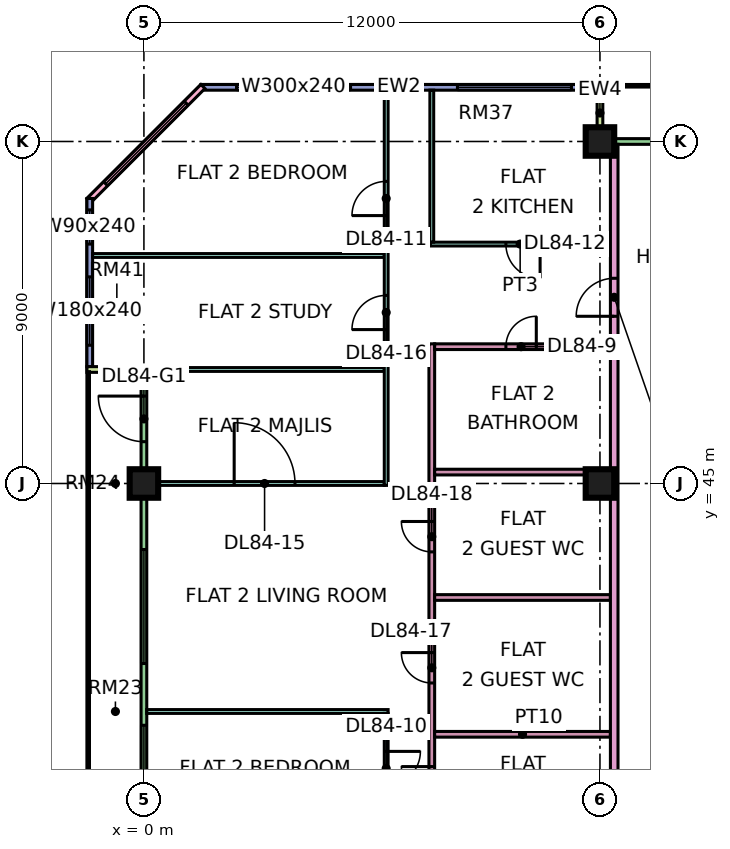
"""IFC4 building model, lengths in metres.
Left out: names, types, materials, properties, quantities, classifications, styles, units other than length and angle.
Written with IfcOpenShell. Run it as: python <this file> out.ifc"""

import sys

from ifc_helpers import new_model, si_unit, direction, frame, frame_2d, origin, origin_2d, place, context, subcontext, project, spatial, rectangle, extrude, element, fill, save


model = new_model("IFC4")
c1 = context("Model", 3, precision=1e-05, world=origin(), true_north=direction((0.0, 1.0)))
c2 = subcontext(c1, "Body", "Model", "MODEL_VIEW")
j1 = project(units=[si_unit("LENGTHUNIT", "METRE"), si_unit("PLANEANGLEUNIT", "RADIAN")], contexts=[c1])
p1 = place(None, origin())
s1 = spatial("IfcSite", under=j1, at=p1, CompositionType="ELEMENT")
p2 = place(p1, origin())
s2 = spatial("IfcBuilding", under=s1, at=p2, CompositionType="ELEMENT")
p3 = place(p2, frame((0.0, 0.0, 361.4)))
s3 = spatial("IfcBuildingStorey", under=s2, at=p3, CompositionType="ELEMENT", Elevation=361.4)
for number, where, z_axis, x_axis in (
    (1, (0.0, 45.0, 0.0), (0.0, 0.0, 1.0), (1.0, 0.0, 0.0)),
    (2, (12.0, 45.0, 0.0), (0.0, 0.0, 1.0), (1.0, 0.0, 0.0)),
    (3, (12.0, 54.0, 0.0), (0.0, 0.0, 1.0), (1.0, 0.0, 0.0)),
):
    element("IfcColumn", number, at=place(p3, frame(where, z_axis=z_axis, x_axis=x_axis)), inside=s3, PredefinedType="COLUMN", context=c2, shape_type="SweptSolid", body=[
        extrude(rectangle(XDim=0.75, YDim=0.75, at=origin_2d()), origin(), (0.0, 0.0, 1.0), 3.75),
    ])
p4 = place(p3, frame((22.425, 54.0, 0.0), z_axis=(0.0, 0.0, 1.0), x_axis=(-1.0, 0.0, 0.0)))
e4 = element("IfcWall", 4, at=p4, inside=s3, PredefinedType="SOLIDWALL", context=c2, shape_type="SweptSolid", body=[
    extrude(rectangle(XDim=10.35, YDim=0.15, at=frame_2d((5.175, 0.0))), origin(), (0.0, 0.0, 1.0), 3.35),
])
p5 = place(p4, frame((1.012, 0.0, 0.45)))
e5 = element("IfcOpeningElement", 5, at=p5, cuts=e4, PredefinedType="OPENING", context=c2, shape_type="SweptSolid", body=[
    extrude(rectangle(XDim=4.8, YDim=2.4, at=frame_2d((2.4, 1.2))), frame((0.0, 0.085, 0.0), z_axis=(0.0, -1.0, 0.0), x_axis=(1.0, 0.0, 0.0)), (0.0, 0.0, 1.0), 0.17),
])
p6 = place(p3, frame((12.0, 55.5, 0.0), z_axis=(0.0, 0.0, 1.0), x_axis=(0.0, -1.0, 0.0)))
e6 = element("IfcWall", 6, at=p6, inside=s3, PredefinedType="SOLIDWALL", context=c2, shape_type="SweptSolid", body=[
    extrude(rectangle(XDim=1.5, YDim=0.15, at=frame_2d((0.75, 0.0))), origin(), (0.0, 0.0, 1.0), 3.35),
])
p7 = place(p3, frame((11.925, 55.425, 0.0), z_axis=(0.0, 0.0, 1.0), x_axis=(-1.0, 0.0, 0.0)))
e7 = element("IfcWall", 7, at=p7, inside=s3, PredefinedType="SOLIDWALL", context=c2, shape_type="SweptSolid", body=[
    extrude(rectangle(XDim=10.425, YDim=0.15, at=frame_2d((5.212, 0.0))), origin(), (0.0, 0.0, 1.0), 3.35),
])
p8 = place(p7, frame((0.675, 0.0, 0.45)))
e8 = element("IfcOpeningElement", 8, at=p8, cuts=e7, PredefinedType="OPENING", context=c2, shape_type="SweptSolid", body=[
    extrude(rectangle(XDim=3.0, YDim=2.4, at=frame_2d((1.5, 1.2))), frame((0.0, 0.085, 0.0), z_axis=(0.0, -1.0, 0.0), x_axis=(1.0, 0.0, 0.0)), (0.0, 0.0, 1.0), 0.17),
])
p9 = place(p7, frame((6.488, 0.0, 0.45)))
e9 = element("IfcOpeningElement", 9, at=p9, cuts=e7, PredefinedType="OPENING", context=c2, shape_type="SweptSolid", body=[
    extrude(rectangle(XDim=3.0, YDim=2.4, at=frame_2d((1.5, 1.2))), frame((0.0, 0.085, 0.0), z_axis=(0.0, -1.0, 0.0), x_axis=(1.0, 0.0, 0.0)), (0.0, 0.0, 1.0), 0.17),
])
p10 = place(p3, frame((1.553, 55.447, 0.0), z_axis=(0.0, 0.0, 1.0), x_axis=(-0.707106781187, -0.707106781187, 0.0)))
e10 = element("IfcWall", 10, at=p10, inside=s3, PredefinedType="SOLIDWALL", context=c2, shape_type="SweptSolid", body=[
    extrude(rectangle(XDim=4.243, YDim=0.15, at=frame_2d((2.121, 0.0))), origin(), (0.0, 0.0, 1.0), 3.35),
])
p11 = place(p10, frame((0.621, 0.0, 0.45)))
e11 = element("IfcOpeningElement", 11, at=p11, cuts=e10, PredefinedType="OPENING", context=c2, shape_type="SweptSolid", body=[
    extrude(rectangle(XDim=3.0, YDim=2.4, at=frame_2d((1.5, 1.2))), frame((0.0, 0.085, 0.0), z_axis=(0.0, -1.0, 0.0), x_axis=(1.0, 0.0, 0.0)), (0.0, 0.0, 1.0), 0.17),
])
p12 = place(p3, frame((-1.425, 52.5, 0.0), z_axis=(0.0, 0.0, 1.0), x_axis=(0.0, -1.0, 0.0)))
e12 = element("IfcWall", 12, at=p12, inside=s3, PredefinedType="SOLIDWALL", context=c2, shape_type="SweptSolid", body=[
    extrude(rectangle(XDim=4.425, YDim=0.15, at=frame_2d((2.212, 0.0))), origin(), (0.0, 0.0, 1.0), 3.35),
])
p13 = place(p12, frame((0.3, 0.0, 0.45)))
e13 = element("IfcOpeningElement", 13, at=p13, cuts=e12, PredefinedType="OPENING", context=c2, shape_type="SweptSolid", body=[
    extrude(rectangle(XDim=0.9, YDim=2.4, at=frame_2d((0.45, 1.2))), frame((0.0, 0.085, 0.0), z_axis=(0.0, -1.0, 0.0), x_axis=(1.0, 0.0, 0.0)), (0.0, 0.0, 1.0), 0.17),
])
p14 = place(p12, frame((2.062, 0.0, 0.45)))
e14 = element("IfcOpeningElement", 14, at=p14, cuts=e12, PredefinedType="OPENING", context=c2, shape_type="SweptSolid", body=[
    extrude(rectangle(XDim=1.8, YDim=2.4, at=frame_2d((0.9, 1.2))), frame((0.0, 0.085, 0.0), z_axis=(0.0, -1.0, 0.0), x_axis=(1.0, 0.0, 0.0)), (0.0, 0.0, 1.0), 0.17),
])
p15 = place(p3, frame((0.0, 47.925, 0.0), z_axis=(0.0, 0.0, 1.0), x_axis=(0.0, -1.0, 0.0)))
e15 = element("IfcWall", 15, at=p15, inside=s3, PredefinedType="SOLIDWALL", context=c2, shape_type="SweptSolid", body=[
    extrude(rectangle(XDim=11.85, YDim=0.15, at=frame_2d((5.925, 0.0))), origin(), (0.0, 0.0, 1.0), 3.35),
])
p16 = place(p15, frame((0.625, 0.0, 0.0)))
e16 = element("IfcOpeningElement", 16, at=p16, cuts=e15, PredefinedType="OPENING", context=c2, shape_type="SweptSolid", body=[
    extrude(rectangle(XDim=1.2, YDim=2.4, at=frame_2d((0.6, 1.2))), frame((0.0, 0.085, 0.0), z_axis=(0.0, -1.0, 0.0), x_axis=(1.0, 0.0, 0.0)), (0.0, 0.0, 1.0), 0.17),
])
p17 = place(p15, frame((4.663, 0.0, 0.45)))
e17 = element("IfcOpeningElement", 17, at=p17, cuts=e15, PredefinedType="OPENING", context=c2, shape_type="SweptSolid", body=[
    extrude(rectangle(XDim=3.0, YDim=2.4, at=frame_2d((1.5, 1.2))), frame((0.0, 0.085, 0.0), z_axis=(0.0, -1.0, 0.0), x_axis=(1.0, 0.0, 0.0)), (0.0, 0.0, 1.0), 0.17),
])
p18 = place(p15, frame((9.288, 0.0, 0.45)))
e18 = element("IfcOpeningElement", 18, at=p18, cuts=e15, PredefinedType="OPENING", context=c2, shape_type="SweptSolid", body=[
    extrude(rectangle(XDim=1.8, YDim=2.4, at=frame_2d((0.9, 1.2))), frame((0.0, 0.085, 0.0), z_axis=(0.0, -1.0, 0.0), x_axis=(1.0, 0.0, 0.0)), (0.0, 0.0, 1.0), 0.17),
])
p19 = place(p3, frame((-1.5, 48.0, 0.0), z_axis=(0.0, 0.0, 1.0), x_axis=(1.0, 0.0, 0.0)))
e19 = element("IfcWall", 19, at=p19, inside=s3, PredefinedType="SOLIDWALL", context=c2, shape_type="SweptSolid", body=[
    extrude(rectangle(XDim=1.5, YDim=0.15, at=frame_2d((0.75, 0.0))), origin(), (0.0, 0.0, 1.0), 3.35),
])
p20 = place(p3, frame((0.0, 48.0, 0.0), z_axis=(0.0, 0.0, 1.0), x_axis=(1.0, 0.0, 0.0)))
e20 = element("IfcWall", 20, at=p20, inside=s3, PredefinedType="PARTITIONING", context=c2, shape_type="SweptSolid", body=[
    extrude(rectangle(XDim=6.325, YDim=0.1, at=frame_2d((3.163, 0.0))), origin(), (0.0, 0.0, 1.0), 3.35),
])
p21 = place(p3, frame((-1.35, 51.0, 0.0), z_axis=(0.0, 0.0, 1.0), x_axis=(1.0, 0.0, 0.0)))
e21 = element("IfcWall", 21, at=p21, inside=s3, PredefinedType="PARTITIONING", context=c2, shape_type="SweptSolid", body=[
    extrude(rectangle(XDim=7.675, YDim=0.1, at=frame_2d((3.837, 0.0))), origin(), (0.0, 0.0, 1.0), 3.35),
])
p22 = place(p3, frame((0.074, 39.0, 0.0), z_axis=(0.0, 0.0, 1.0), x_axis=(1.0, 0.0, 0.0)))
e22 = element("IfcWall", 22, at=p22, inside=s3, PredefinedType="PARTITIONING", context=c2, shape_type="SweptSolid", body=[
    extrude(rectangle(XDim=6.351, YDim=0.1, at=frame_2d((3.176, 0.0))), origin(), (0.0, 0.0, 1.0), 3.35),
])
p23 = place(p3, frame((0.074, 45.0, 0.0), z_axis=(0.0, 0.0, 1.0), x_axis=(1.0, 0.0, 0.0)))
e23 = element("IfcWall", 23, at=p23, inside=s3, PredefinedType="PARTITIONING", context=c2, shape_type="SweptSolid", body=[
    extrude(rectangle(XDim=6.251, YDim=0.1, at=frame_2d((3.125, 0.0))), origin(), (0.0, 0.0, 1.0), 3.35),
])
p24 = place(p23, frame((2.301, 0.0, 0.0)))
e24 = element("IfcOpeningElement", 24, at=p24, cuts=e23, PredefinedType="OPENING", context=c2, shape_type="SweptSolid", body=[
    extrude(rectangle(XDim=1.6, YDim=2.1, at=frame_2d((0.8, 1.05))), frame((0.0, 0.06, 0.0), z_axis=(0.0, -1.0, 0.0), x_axis=(1.0, 0.0, 0.0)), (0.0, 0.0, 1.0), 0.12),
])
p25 = place(p3, frame((6.375, 36.1, 0.0), z_axis=(0.0, 0.0, 1.0), x_axis=(0.0, 1.0, 0.0)))
e25 = element("IfcWall", 25, at=p25, inside=s3, PredefinedType="PARTITIONING", context=c2, shape_type="SweptSolid", body=[
    extrude(rectangle(XDim=2.85, YDim=0.1, at=frame_2d((1.425, 0.0))), origin(), (0.0, 0.0, 1.0), 3.35),
])
p26 = place(p25, frame((0.95, 0.0, 0.0)))
e26 = element("IfcOpeningElement", 26, at=p26, cuts=e25, PredefinedType="OPENING", context=c2, shape_type="SweptSolid", body=[
    extrude(rectangle(XDim=0.9, YDim=2.1, at=frame_2d((0.45, 1.05))), frame((0.0, 0.06, 0.0), z_axis=(0.0, -1.0, 0.0), x_axis=(1.0, 0.0, 0.0)), (0.0, 0.0, 1.0), 0.12),
])
p27 = place(p3, frame((6.375, 44.95, 0.0), z_axis=(0.0, 0.0, 1.0), x_axis=(0.0, 1.0, 0.0)))
e27 = element("IfcWall", 27, at=p27, inside=s3, PredefinedType="PARTITIONING", context=c2, shape_type="SweptSolid", body=[
    extrude(rectangle(XDim=10.4, YDim=0.1, at=frame_2d((5.2, 0.0))), origin(), (0.0, 0.0, 1.0), 3.35),
])
p28 = place(p27, frame((7.1, 0.0, 0.0)))
e28 = element("IfcOpeningElement", 28, at=p28, cuts=e27, PredefinedType="OPENING", context=c2, shape_type="SweptSolid", body=[
    extrude(rectangle(XDim=0.9, YDim=2.1, at=frame_2d((0.45, 1.05))), frame((0.0, 0.06, 0.0), z_axis=(0.0, -1.0, 0.0), x_axis=(1.0, 0.0, 0.0)), (0.0, 0.0, 1.0), 0.12),
])
p29 = place(p27, frame((4.1, 0.0, 0.0)))
e29 = element("IfcOpeningElement", 29, at=p29, cuts=e27, PredefinedType="OPENING", context=c2, shape_type="SweptSolid", body=[
    extrude(rectangle(XDim=0.9, YDim=2.1, at=frame_2d((0.45, 1.05))), frame((0.0, 0.06, 0.0), z_axis=(0.0, -1.0, 0.0), x_axis=(1.0, 0.0, 0.0)), (0.0, 0.0, 1.0), 0.12),
])
p30 = place(p3, frame((7.525, 51.3, 0.0), z_axis=(0.0, 0.0, 1.0), x_axis=(1.0, 0.0, 0.0)))
e30 = element("IfcWall", 30, at=p30, inside=s3, PredefinedType="PARTITIONING", context=c2, shape_type="SweptSolid", body=[
    extrude(rectangle(XDim=4.75, YDim=0.1, at=frame_2d((2.375, 0.0))), origin(), (0.0, 0.0, 1.0), 3.35),
])
p31 = place(p30, frame((2.0, 0.0, 0.0)))
e31 = element("IfcOpeningElement", 31, at=p31, cuts=e30, PredefinedType="OPENING", context=c2, shape_type="SweptSolid", body=[
    extrude(rectangle(XDim=0.9, YDim=2.1, at=frame_2d((0.45, 1.05))), frame((0.0, 0.06, 0.0), z_axis=(0.0, -1.0, 0.0), x_axis=(1.0, 0.0, 0.0)), (0.0, 0.0, 1.0), 0.12),
])
p32 = place(p3, frame((7.575, 36.1, 0.0), z_axis=(0.0, 0.0, 1.0), x_axis=(0.0, 1.0, 0.0)))
e32 = element("IfcWall", 32, at=p32, inside=s3, PredefinedType="PARTITIONING", context=c2, shape_type="SweptSolid", body=[
    extrude(rectangle(XDim=12.575, YDim=0.15, at=frame_2d((6.288, 0.0))), origin(), (0.0, 0.0, 1.0), 3.35),
])
p33 = place(p32, frame((0.65, 0.0, 0.0)))
e33 = element("IfcOpeningElement", 33, at=p33, cuts=e32, PredefinedType="OPENING", context=c2, shape_type="SweptSolid", body=[
    extrude(rectangle(XDim=0.8, YDim=2.1, at=frame_2d((0.4, 1.05))), frame((0.0, 0.085, 0.0), z_axis=(0.0, -1.0, 0.0), x_axis=(1.0, 0.0, 0.0)), (0.0, 0.0, 1.0), 0.17),
])
p34 = place(p32, frame((3.65, 0.0, 0.0)))
e34 = element("IfcOpeningElement", 34, at=p34, cuts=e32, PredefinedType="OPENING", context=c2, shape_type="SweptSolid", body=[
    extrude(rectangle(XDim=0.8, YDim=2.1, at=frame_2d((0.4, 1.05))), frame((0.0, 0.085, 0.0), z_axis=(0.0, -1.0, 0.0), x_axis=(1.0, 0.0, 0.0)), (0.0, 0.0, 1.0), 0.17),
])
p35 = place(p32, frame((7.1, 0.0, 0.0)))
e35 = element("IfcOpeningElement", 35, at=p35, cuts=e32, PredefinedType="OPENING", context=c2, shape_type="SweptSolid", body=[
    extrude(rectangle(XDim=0.8, YDim=2.1, at=frame_2d((0.4, 1.05))), frame((0.0, 0.085, 0.0), z_axis=(0.0, -1.0, 0.0), x_axis=(1.0, 0.0, 0.0)), (0.0, 0.0, 1.0), 0.17),
])
p36 = place(p3, frame((7.575, 51.35, 0.0), z_axis=(0.0, 0.0, 1.0), x_axis=(0.0, 1.0, 0.0)))
e36 = element("IfcWall", 36, at=p36, inside=s3, PredefinedType="PARTITIONING", context=c2, shape_type="SweptSolid", body=[
    extrude(rectangle(XDim=4.0, YDim=0.1, at=frame_2d((2.0, 0.0))), origin(), (0.0, 0.0, 1.0), 3.35),
])
for number, where, z_axis, x_axis in (
    (37, (7.65, 38.4, 0.0), (0.0, 0.0, 1.0), (1.0, 0.0, 0.0)),
    (38, (7.65, 42.0, 0.0), (0.0, 0.0, 1.0), (1.0, 0.0, 0.0)),
    (39, (7.65, 45.3, 0.0), (0.0, 0.0, 1.0), (1.0, 0.0, 0.0)),
):
    element("IfcWall", number, at=place(p3, frame(where, z_axis=z_axis, x_axis=x_axis)), inside=s3, PredefinedType="PARTITIONING", context=c2, shape_type="SweptSolid", body=[
        extrude(rectangle(XDim=4.625, YDim=0.15, at=frame_2d((2.312, 0.0))), origin(), (0.0, 0.0, 1.0), 3.35),
    ])
p37 = place(p3, frame((7.65, 48.6, 0.0), z_axis=(0.0, 0.0, 1.0), x_axis=(1.0, 0.0, 0.0)))
e40 = element("IfcWall", 40, at=p37, inside=s3, PredefinedType="PARTITIONING", context=c2, shape_type="SweptSolid", body=[
    extrude(rectangle(XDim=4.625, YDim=0.15, at=frame_2d((2.312, 0.0))), origin(), (0.0, 0.0, 1.0), 3.35),
])
p38 = place(p37, frame((1.875, 0.0, 0.0)))
e41 = element("IfcOpeningElement", 41, at=p38, cuts=e40, PredefinedType="OPENING", context=c2, shape_type="SweptSolid", body=[
    extrude(rectangle(XDim=0.8, YDim=2.1, at=frame_2d((0.4, 1.05))), frame((0.0, 0.085, 0.0), z_axis=(0.0, -1.0, 0.0), x_axis=(1.0, 0.0, 0.0)), (0.0, 0.0, 1.0), 0.17),
])
p39 = place(p3, frame((12.375, 20.0, 0.0), z_axis=(0.0, 0.0, 1.0), x_axis=(0.0, 1.0, 0.0)))
e42 = element("IfcWall", 42, at=p39, inside=s3, PredefinedType="PARTITIONING", context=c2, shape_type="SweptSolid", body=[
    extrude(rectangle(XDim=33.926, YDim=0.2, at=frame_2d((16.963, 0.0))), origin(), (0.0, 0.0, 1.0), 3.35),
])
p40 = place(p39, frame((29.4, 0.0, 0.0)))
e43 = element("IfcOpeningElement", 43, at=p40, cuts=e42, PredefinedType="OPENING", context=c2, shape_type="SweptSolid", body=[
    extrude(rectangle(XDim=1.0, YDim=2.1, at=frame_2d((0.5, 1.05))), frame((0.0, 0.11, 0.0), z_axis=(0.0, -1.0, 0.0), x_axis=(1.0, 0.0, 0.0)), (0.0, 0.0, 1.0), 0.22),
])
p41 = place(p39, frame((0.6, 0.0, 0.0)))
e44 = element("IfcOpeningElement", 44, at=p41, cuts=e42, PredefinedType="OPENING", context=c2, shape_type="SweptSolid", body=[
    extrude(rectangle(XDim=1.2, YDim=2.1, at=frame_2d((0.6, 1.05))), frame((0.0, 0.11, 0.0), z_axis=(0.0, -1.0, 0.0), x_axis=(1.0, 0.0, 0.0)), (0.0, 0.0, 1.0), 0.22),
])
p42 = place(p39, frame((4.5, 0.0, 0.0)))
e45 = element("IfcOpeningElement", 45, at=p42, cuts=e42, PredefinedType="OPENING", context=c2, shape_type="SweptSolid", body=[
    extrude(rectangle(XDim=1.0, YDim=2.1, at=frame_2d((0.5, 1.05))), frame((0.0, 0.11, 0.0), z_axis=(0.0, -1.0, 0.0), x_axis=(1.0, 0.0, 0.0)), (0.0, 0.0, 1.0), 0.22),
])
p43 = place(p8, origin())
e46 = element("IfcWindow", 46, at=p43, inside=s3, PartitioningType="SINGLE_PANEL", PredefinedType="WINDOW", context=c2, shape_type="SweptSolid", body=[
    extrude(rectangle(XDim=3.0, YDim=2.4, at=frame_2d((1.5, 1.2))), frame((0.0, 0.03, 0.0), z_axis=(0.0, -1.0, 0.0), x_axis=(1.0, 0.0, 0.0)), (0.0, 0.0, 1.0), 0.06),
])
fill(e8, e46)
p44 = place(p9, origin())
e47 = element("IfcWindow", 47, at=p44, inside=s3, PartitioningType="SINGLE_PANEL", PredefinedType="WINDOW", context=c2, shape_type="SweptSolid", body=[
    extrude(rectangle(XDim=3.0, YDim=2.4, at=frame_2d((1.5, 1.2))), frame((0.0, 0.03, 0.0), z_axis=(0.0, -1.0, 0.0), x_axis=(1.0, 0.0, 0.0)), (0.0, 0.0, 1.0), 0.06),
])
fill(e9, e47)
p45 = place(p11, origin())
e48 = element("IfcWindow", 48, at=p45, inside=s3, PartitioningType="SINGLE_PANEL", PredefinedType="WINDOW", context=c2, shape_type="SweptSolid", body=[
    extrude(rectangle(XDim=3.0, YDim=2.4, at=frame_2d((1.5, 1.2))), frame((0.0, 0.03, 0.0), z_axis=(0.0, -1.0, 0.0), x_axis=(1.0, 0.0, 0.0)), (0.0, 0.0, 1.0), 0.06),
])
fill(e11, e48)
p46 = place(p13, origin())
e49 = element("IfcWindow", 49, at=p46, inside=s3, PartitioningType="SINGLE_PANEL", PredefinedType="WINDOW", context=c2, shape_type="SweptSolid", body=[
    extrude(rectangle(XDim=0.9, YDim=2.4, at=frame_2d((0.45, 1.2))), frame((0.0, 0.03, 0.0), z_axis=(0.0, -1.0, 0.0), x_axis=(1.0, 0.0, 0.0)), (0.0, 0.0, 1.0), 0.06),
])
fill(e13, e49)
p47 = place(p14, origin())
e50 = element("IfcWindow", 50, at=p47, inside=s3, PartitioningType="SINGLE_PANEL", PredefinedType="WINDOW", context=c2, shape_type="SweptSolid", body=[
    extrude(rectangle(XDim=1.8, YDim=2.4, at=frame_2d((0.9, 1.2))), frame((0.0, 0.03, 0.0), z_axis=(0.0, -1.0, 0.0), x_axis=(1.0, 0.0, 0.0)), (0.0, 0.0, 1.0), 0.06),
])
fill(e14, e50)
p48 = place(p16, frame((1.2, 0.0, 0.0), z_axis=(0.0, 0.0, 1.0), x_axis=(-1.0, 0.0, 0.0)))
e51 = element("IfcDoor", 51, at=p48, inside=s3, OperationType="DOUBLE_DOOR_SINGLE_SWING", PredefinedType="DOOR", context=c2, shape_type="SweptSolid", body=[
    extrude(rectangle(XDim=1.2, YDim=2.4, at=frame_2d((0.6, 1.2))), frame((0.0, 0.025, 0.0), z_axis=(0.0, -1.0, 0.0), x_axis=(1.0, 0.0, 0.0)), (0.0, 0.0, 1.0), 0.05),
])
fill(e16, e51)
p49 = place(p17, origin())
e52 = element("IfcWindow", 52, at=p49, inside=s3, PartitioningType="SINGLE_PANEL", PredefinedType="WINDOW", context=c2, shape_type="SweptSolid", body=[
    extrude(rectangle(XDim=3.0, YDim=2.4, at=frame_2d((1.5, 1.2))), frame((0.0, 0.03, 0.0), z_axis=(0.0, -1.0, 0.0), x_axis=(1.0, 0.0, 0.0)), (0.0, 0.0, 1.0), 0.06),
])
fill(e17, e52)
p50 = place(p18, origin())
e53 = element("IfcWindow", 53, at=p50, inside=s3, PartitioningType="SINGLE_PANEL", PredefinedType="WINDOW", context=c2, shape_type="SweptSolid", body=[
    extrude(rectangle(XDim=1.8, YDim=2.4, at=frame_2d((0.9, 1.2))), frame((0.0, 0.03, 0.0), z_axis=(0.0, -1.0, 0.0), x_axis=(1.0, 0.0, 0.0)), (0.0, 0.0, 1.0), 0.06),
])
fill(e18, e53)
p51 = place(p38, frame((0.8, 0.0, 0.0), z_axis=(0.0, 0.0, 1.0), x_axis=(-1.0, 0.0, 0.0)))
e54 = element("IfcDoor", 54, at=p51, inside=s3, OperationType="SINGLE_SWING_RIGHT", PredefinedType="DOOR", context=c2, shape_type="SweptSolid", body=[
    extrude(rectangle(XDim=0.8, YDim=2.1, at=frame_2d((0.4, 1.05))), frame((0.0, 0.025, 0.0), z_axis=(0.0, -1.0, 0.0), x_axis=(1.0, 0.0, 0.0)), (0.0, 0.0, 1.0), 0.05),
])
fill(e41, e54)
p52 = place(p26, origin())
e55 = element("IfcDoor", 55, at=p52, inside=s3, OperationType="SINGLE_SWING_RIGHT", PredefinedType="DOOR", context=c2, shape_type="SweptSolid", body=[
    extrude(rectangle(XDim=0.9, YDim=2.1, at=frame_2d((0.45, 1.05))), frame((0.0, 0.025, 0.0), z_axis=(0.0, -1.0, 0.0), x_axis=(1.0, 0.0, 0.0)), (0.0, 0.0, 1.0), 0.05),
])
fill(e26, e55)
p53 = place(p28, origin())
e56 = element("IfcDoor", 56, at=p53, inside=s3, OperationType="SINGLE_SWING_LEFT", PredefinedType="DOOR", context=c2, shape_type="SweptSolid", body=[
    extrude(rectangle(XDim=0.9, YDim=2.1, at=frame_2d((0.45, 1.05))), frame((0.0, 0.025, 0.0), z_axis=(0.0, -1.0, 0.0), x_axis=(1.0, 0.0, 0.0)), (0.0, 0.0, 1.0), 0.05),
])
fill(e28, e56)
p54 = place(p31, origin())
e57 = element("IfcDoor", 57, at=p54, inside=s3, OperationType="SINGLE_SWING_RIGHT", PredefinedType="DOOR", context=c2, shape_type="SweptSolid", body=[
    extrude(rectangle(XDim=0.9, YDim=2.1, at=frame_2d((0.45, 1.05))), frame((0.0, 0.025, 0.0), z_axis=(0.0, -1.0, 0.0), x_axis=(1.0, 0.0, 0.0)), (0.0, 0.0, 1.0), 0.05),
])
fill(e31, e57)
p55 = place(p33, frame((0.8, 0.0, 0.0), z_axis=(0.0, 0.0, 1.0), x_axis=(-1.0, 0.0, 0.0)))
e58 = element("IfcDoor", 58, at=p55, inside=s3, OperationType="SINGLE_SWING_RIGHT", PredefinedType="DOOR", context=c2, shape_type="SweptSolid", body=[
    extrude(rectangle(XDim=0.8, YDim=2.1, at=frame_2d((0.4, 1.05))), frame((0.0, 0.025, 0.0), z_axis=(0.0, -1.0, 0.0), x_axis=(1.0, 0.0, 0.0)), (0.0, 0.0, 1.0), 0.05),
])
fill(e33, e58)
p56 = place(p40, origin())
e59 = element("IfcDoor", 59, at=p56, inside=s3, OperationType="SINGLE_SWING_LEFT", PredefinedType="DOOR", context=c2, shape_type="SweptSolid", body=[
    extrude(rectangle(XDim=1.0, YDim=2.1, at=frame_2d((0.5, 1.05))), frame((0.0, 0.025, 0.0), z_axis=(0.0, -1.0, 0.0), x_axis=(1.0, 0.0, 0.0)), (0.0, 0.0, 1.0), 0.05),
])
fill(e43, e59)
p57 = place(p24, origin())
e60 = element("IfcDoor", 60, at=p57, inside=s3, OperationType="DOUBLE_DOOR_SINGLE_SWING", PredefinedType="DOOR", context=c2, shape_type="SweptSolid", body=[
    extrude(rectangle(XDim=1.6, YDim=2.1, at=frame_2d((0.8, 1.05))), frame((0.0, 0.025, 0.0), z_axis=(0.0, -1.0, 0.0), x_axis=(1.0, 0.0, 0.0)), (0.0, 0.0, 1.0), 0.05),
])
fill(e24, e60)
p58 = place(p29, origin())
e61 = element("IfcDoor", 61, at=p58, inside=s3, OperationType="SINGLE_SWING_LEFT", PredefinedType="DOOR", context=c2, shape_type="SweptSolid", body=[
    extrude(rectangle(XDim=0.9, YDim=2.1, at=frame_2d((0.45, 1.05))), frame((0.0, 0.025, 0.0), z_axis=(0.0, -1.0, 0.0), x_axis=(1.0, 0.0, 0.0)), (0.0, 0.0, 1.0), 0.05),
])
fill(e29, e61)
p59 = place(p34, frame((0.8, 0.0, 0.0), z_axis=(0.0, 0.0, 1.0), x_axis=(-1.0, 0.0, 0.0)))
e62 = element("IfcDoor", 62, at=p59, inside=s3, OperationType="SINGLE_SWING_RIGHT", PredefinedType="DOOR", context=c2, shape_type="SweptSolid", body=[
    extrude(rectangle(XDim=0.8, YDim=2.1, at=frame_2d((0.4, 1.05))), frame((0.0, 0.025, 0.0), z_axis=(0.0, -1.0, 0.0), x_axis=(1.0, 0.0, 0.0)), (0.0, 0.0, 1.0), 0.05),
])
fill(e34, e62)
p60 = place(p35, frame((0.8, 0.0, 0.0), z_axis=(0.0, 0.0, 1.0), x_axis=(-1.0, 0.0, 0.0)))
e63 = element("IfcDoor", 63, at=p60, inside=s3, OperationType="SINGLE_SWING_RIGHT", PredefinedType="DOOR", context=c2, shape_type="SweptSolid", body=[
    extrude(rectangle(XDim=0.8, YDim=2.1, at=frame_2d((0.4, 1.05))), frame((0.0, 0.025, 0.0), z_axis=(0.0, -1.0, 0.0), x_axis=(1.0, 0.0, 0.0)), (0.0, 0.0, 1.0), 0.05),
])
fill(e35, e63)
save(model, sys.argv[1])
